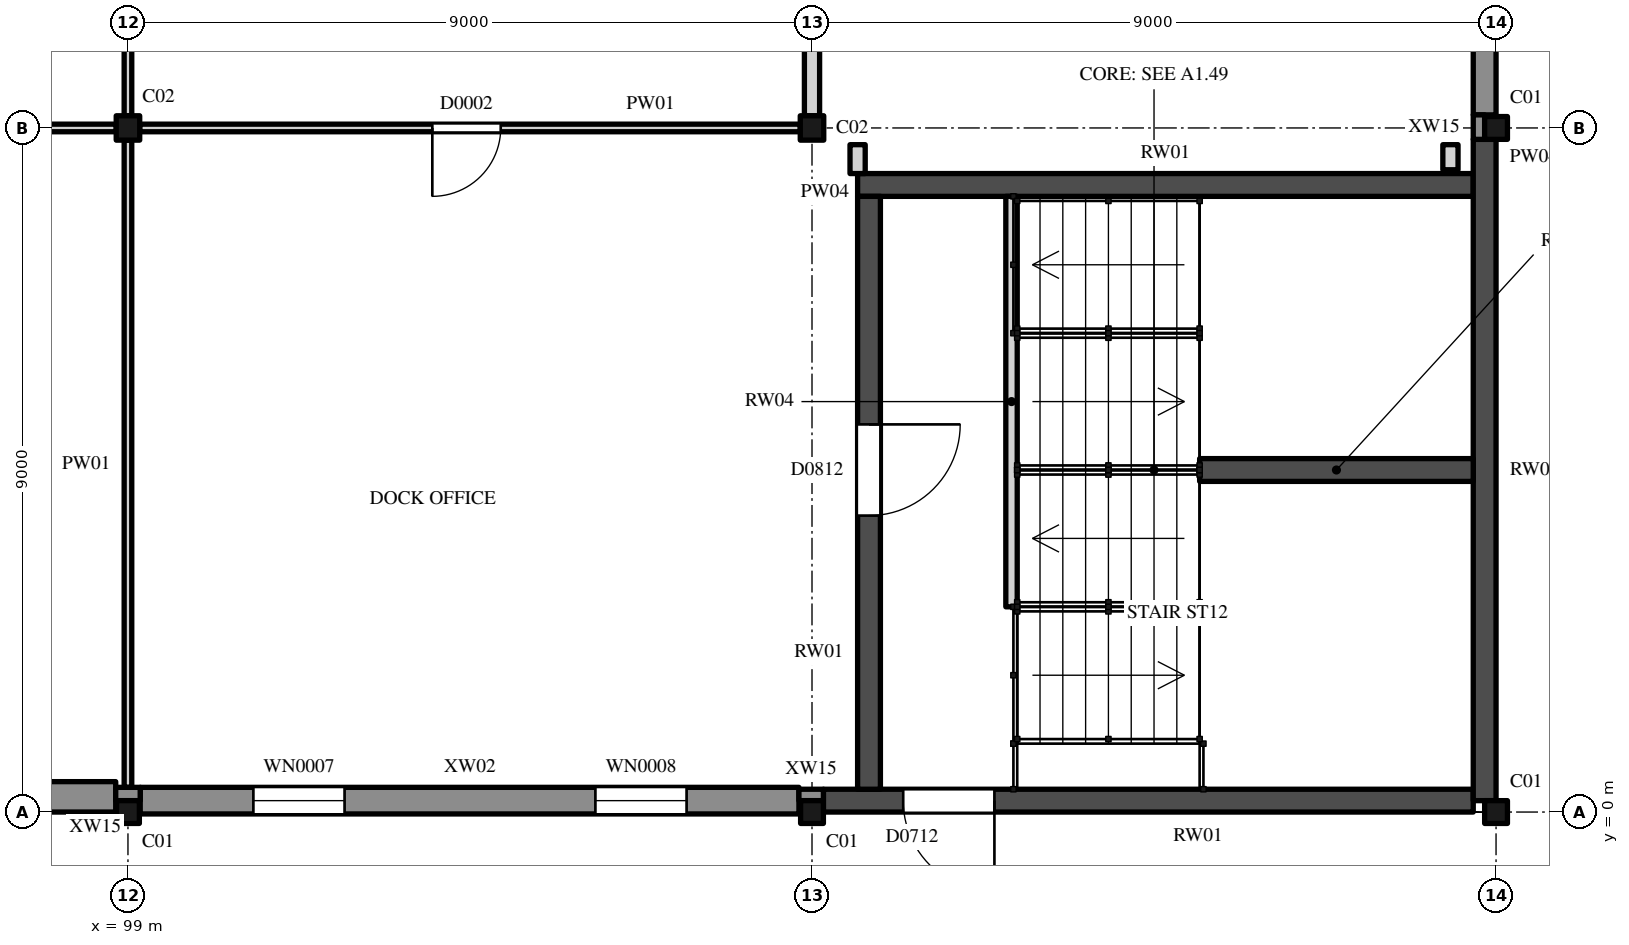
"""IFC4 building model, lengths in metres.
Left out: names, types, materials, properties, quantities, classifications, styles, units other than length and angle.
Written with IfcOpenShell. Run it as: python <this file> out.ifc"""

import sys

from ifc_helpers import new_model, si_unit, direction, frame, frame_2d, origin, origin_2d, place, context, subcontext, project, spatial, rectangle, hollow_rectangle, i_section, extrude, element, fill, save


model = new_model("IFC4")
c1 = context("Model", 3, precision=1e-05, world=origin(), true_north=direction((0.0, 1.0)))
c2 = subcontext(c1, "Body", "Model", "MODEL_VIEW")
j1 = project(units=[si_unit("LENGTHUNIT", "METRE"), si_unit("PLANEANGLEUNIT", "RADIAN")], contexts=[c1])
p1 = place(None, origin())
s1 = spatial("IfcSite", under=j1, at=p1, CompositionType="ELEMENT")
p2 = place(p1, origin())
s2 = spatial("IfcBuilding", under=s1, at=p2, CompositionType="ELEMENT")
p3 = place(p2, origin())
s3 = spatial("IfcBuildingStorey", under=s2, at=p3, CompositionType="ELEMENT", Elevation=0.0)
for number, where, z_axis, x_axis in (
    (1, (99.0, 0.0, 0.0), (0.0, 0.0, 1.0), (1.0, 0.0, 0.0)),
    (2, (108.0, 0.0, 0.0), (0.0, 0.0, 1.0), (1.0, 0.0, 0.0)),
    (3, (117.0, 0.0, 0.0), (0.0, 0.0, 1.0), (1.0, 0.0, 0.0)),
):
    element("IfcColumn", number, at=place(p3, frame(where, z_axis=z_axis, x_axis=x_axis)), inside=s3, PredefinedType="COLUMN", context=c2, shape_type="SweptSolid", body=[
        extrude(hollow_rectangle(XDim=0.3, YDim=0.3, WallThickness=0.012, InnerFilletRadius=0.019, OuterFilletRadius=0.031, at=origin_2d()), origin(), (0.0, 0.0, 1.0), 6.0),
    ])
for number, where, z_axis, x_axis in (
    (4, (99.0, 9.0, 0.0), (0.0, 0.0, 1.0), (1.0, 0.0, 0.0)),
    (5, (108.0, 9.0, 0.0), (0.0, 0.0, 1.0), (1.0, 0.0, 0.0)),
):
    element("IfcColumn", number, at=place(p3, frame(where, z_axis=z_axis, x_axis=x_axis)), inside=s3, PredefinedType="COLUMN", context=c2, shape_type="SweptSolid", body=[
        extrude(i_section(OverallWidth=0.309, OverallDepth=0.321, WebThickness=0.014, FlangeThickness=0.022, FilletRadius=0.017, at=origin_2d()), origin(), (0.0, 0.0, 1.0), 6.0),
    ])
p4 = place(p3, frame((117.0, 9.0, 0.0), z_axis=(0.0, 0.0, 1.0), x_axis=(1.0, 0.0, 0.0)))
e6 = element("IfcColumn", 6, at=p4, inside=s3, PredefinedType="COLUMN", context=c2, shape_type="SweptSolid", body=[
    extrude(hollow_rectangle(XDim=0.3, YDim=0.3, WallThickness=0.012, InnerFilletRadius=0.019, OuterFilletRadius=0.031, at=origin_2d()), origin(), (0.0, 0.0, 1.0), 6.0),
])
p5 = place(p3, frame((108.15, 0.15, 0.0), z_axis=(0.0, 0.0, 1.0), x_axis=(1.0, 0.0, 0.0)))
e7 = element("IfcWall", 7, at=p5, inside=s3, PredefinedType="SHEAR", context=c2, shape_type="SweptSolid", body=[
    extrude(rectangle(XDim=8.55, YDim=0.3, at=frame_2d((4.275, 0.0))), origin(), (0.0, 0.0, 1.0), 6.0),
])
p6 = place(p5, frame((1.05, 0.0, 0.0)))
e8 = element("IfcOpeningElement", 8, at=p6, cuts=e7, PredefinedType="OPENING", context=c2, shape_type="SweptSolid", body=[
    extrude(rectangle(XDim=1.2, YDim=2.1, at=frame_2d((0.6, 1.05))), frame((0.0, 0.16, 0.0), z_axis=(0.0, -1.0, 0.0), x_axis=(1.0, 0.0, 0.0)), (0.0, 0.0, 1.0), 0.32),
])
p7 = place(p3, frame((108.6, 8.25, 0.0), z_axis=(0.0, 0.0, 1.0), x_axis=(1.0, 0.0, 0.0)))
e9 = element("IfcWall", 9, at=p7, inside=s3, PredefinedType="SHEAR", context=c2, shape_type="SweptSolid", body=[
    extrude(rectangle(XDim=8.1, YDim=0.3, at=frame_2d((4.05, 0.0))), origin(), (0.0, 0.0, 1.0), 6.0),
])
p8 = place(p3, frame((108.75, 0.3, 0.0), z_axis=(0.0, 0.0, 1.0), x_axis=(0.0, 1.0, 0.0)))
e10 = element("IfcWall", 10, at=p8, inside=s3, PredefinedType="SHEAR", context=c2, shape_type="SweptSolid", body=[
    extrude(rectangle(XDim=7.8, YDim=0.3, at=frame_2d((3.9, 0.0))), origin(), (0.0, 0.0, 1.0), 6.0),
])
p9 = place(p8, frame((3.6, 0.0, 0.0)))
e11 = element("IfcOpeningElement", 11, at=p9, cuts=e10, PredefinedType="OPENING", context=c2, shape_type="SweptSolid", body=[
    extrude(rectangle(XDim=1.2, YDim=2.1, at=frame_2d((0.6, 1.05))), frame((0.0, 0.16, 0.0), z_axis=(0.0, -1.0, 0.0), x_axis=(1.0, 0.0, 0.0)), (0.0, 0.0, 1.0), 0.32),
])
p10 = place(p3, frame((116.85, 0.15, 0.0), z_axis=(0.0, 0.0, 1.0), x_axis=(0.0, 1.0, 0.0)))
e12 = element("IfcWall", 12, at=p10, inside=s3, PredefinedType="SHEAR", context=c2, shape_type="SweptSolid", body=[
    extrude(rectangle(XDim=8.7, YDim=0.3, at=frame_2d((4.35, 0.0))), origin(), (0.0, 0.0, 1.0), 6.0),
])
p11 = place(p3, frame((113.1, 4.5, 0.0), z_axis=(0.0, 0.0, 1.0), x_axis=(1.0, 0.0, 0.0)))
e13 = element("IfcWall", 13, at=p11, inside=s3, PredefinedType="SHEAR", context=c2, shape_type="SweptSolid", body=[
    extrude(rectangle(XDim=3.6, YDim=0.3, at=frame_2d((1.8, 0.0))), origin(), (0.0, 0.0, 1.0), 6.0),
])
p12 = place(p3, frame((110.625, 2.7, 0.0), z_axis=(0.0, 0.0, 1.0), x_axis=(0.0, 1.0, 0.0)))
e14 = element("IfcWall", 14, at=p12, inside=s3, PredefinedType="STANDARD", context=c2, shape_type="SweptSolid", body=[
    extrude(rectangle(XDim=5.4, YDim=0.15, at=frame_2d((2.7, 0.0))), origin(), (0.0, 0.0, 1.0), 2.8),
])
p13 = place(p3, frame((90.161, 0.2, 0.0), z_axis=(0.0, 0.0, 1.0), x_axis=(1.0, 0.0, 0.0)))
e15 = element("IfcWall", 15, at=p13, inside=s3, PredefinedType="SOLIDWALL", context=c2, shape_type="SweptSolid", body=[
    extrude(rectangle(XDim=8.678, YDim=0.4, at=frame_2d((4.339, 0.0))), origin(), (0.0, 0.0, 1.0), 5.419),
])
p14 = place(p13, frame((2.089, 0.0, 0.0)))
e16 = element("IfcOpeningElement", 16, at=p14, cuts=e15, PredefinedType="OPENING", context=c2, shape_type="SweptSolid", body=[
    extrude(rectangle(XDim=4.5, YDim=4.5, at=frame_2d((2.25, 2.25))), frame((0.0, 0.21, 0.0), z_axis=(0.0, -1.0, 0.0), x_axis=(1.0, 0.0, 0.0)), (0.0, 0.0, 1.0), 0.42),
])
p15 = place(p3, frame((99.161, 0.15, 0.0), z_axis=(0.0, 0.0, 1.0), x_axis=(1.0, 0.0, 0.0)))
e17 = element("IfcWall", 17, at=p15, inside=s3, PredefinedType="SOLIDWALL", context=c2, shape_type="SweptSolid", body=[
    extrude(rectangle(XDim=8.667, YDim=0.35, at=frame_2d((4.333, 0.0))), origin(), (0.0, 0.0, 1.0), 5.419),
])
p16 = place(p15, frame((1.489, 0.0, 1.2)))
e18 = element("IfcOpeningElement", 18, at=p16, cuts=e17, PredefinedType="OPENING", context=c2, shape_type="SweptSolid", body=[
    extrude(rectangle(XDim=1.2, YDim=1.5, at=frame_2d((0.6, 0.75))), frame((0.0, 0.185, 0.0), z_axis=(0.0, -1.0, 0.0), x_axis=(1.0, 0.0, 0.0)), (0.0, 0.0, 1.0), 0.37),
])
p17 = place(p15, frame((5.989, 0.0, 1.2)))
e19 = element("IfcOpeningElement", 19, at=p17, cuts=e17, PredefinedType="OPENING", context=c2, shape_type="SweptSolid", body=[
    extrude(rectangle(XDim=1.2, YDim=1.5, at=frame_2d((0.6, 0.75))), frame((0.0, 0.185, 0.0), z_axis=(0.0, -1.0, 0.0), x_axis=(1.0, 0.0, 0.0)), (0.0, 0.0, 1.0), 0.37),
])
p18 = place(p3, frame((116.85, 9.172, 0.0), z_axis=(0.0, 0.0, 1.0), x_axis=(0.0, 1.0, 0.0)))
e20 = element("IfcWall", 20, at=p18, inside=s3, PredefinedType="SOLIDWALL", context=c2, shape_type="SweptSolid", body=[
    extrude(rectangle(XDim=8.667, YDim=0.3, at=frame_2d((4.333, 0.0))), origin(), (0.0, 0.0, 1.0), 5.292),
])
p19 = place(p18, frame((3.128, 0.0, 0.9)))
e21 = element("IfcOpeningElement", 21, at=p19, cuts=e20, PredefinedType="OPENING", context=c2, shape_type="SweptSolid", body=[
    extrude(rectangle(XDim=2.4, YDim=1.8, at=frame_2d((1.2, 0.9))), frame((0.0, 0.16, 0.0), z_axis=(0.0, -1.0, 0.0), x_axis=(1.0, 0.0, 0.0)), (0.0, 0.0, 1.0), 0.32),
])
p20 = place(p3, frame((98.839, 0.238, 0.0), z_axis=(0.0, 0.0, 1.0), x_axis=(1.0, 0.0, 0.0)))
e22 = element("IfcWall", 22, at=p20, inside=s3, PredefinedType="SOLIDWALL", context=c2, shape_type="SweptSolid", body=[
    extrude(rectangle(XDim=0.322, YDim=0.175, at=frame_2d((0.161, 0.0))), origin(), (0.0, 0.0, 1.0), 5.419),
])
for number, where, z_axis, x_axis in (
    (23, (107.828, 0.225, 0.0), (0.0, 0.0, 1.0), (1.0, 0.0, 0.0)),
    (24, (116.775, 8.85, 0.0), (0.0, 0.0, 1.0), (0.0, 1.0, 0.0)),
):
    element("IfcWall", number, at=place(p3, frame(where, z_axis=z_axis, x_axis=x_axis)), inside=s3, PredefinedType="SOLIDWALL", context=c2, shape_type="SweptSolid", body=[
        extrude(rectangle(XDim=0.322, YDim=0.15, at=frame_2d((0.161, 0.0))), origin(), (0.0, 0.0, 1.0), 6.0),
    ])
p21 = place(p3, frame((90.155, 9.0, 0.0), z_axis=(0.0, 0.0, 1.0), x_axis=(1.0, 0.0, 0.0)))
e25 = element("IfcWall", 25, at=p21, inside=s3, PredefinedType="PARTITIONING", context=c2, shape_type="SweptSolid", body=[
    extrude(rectangle(XDim=8.691, YDim=0.1, at=frame_2d((4.345, 0.0))), origin(), (0.0, 0.0, 1.0), 5.419),
])
p22 = place(p3, frame((99.155, 9.0, 0.0), z_axis=(0.0, 0.0, 1.0), x_axis=(1.0, 0.0, 0.0)))
e26 = element("IfcWall", 26, at=p22, inside=s3, PredefinedType="PARTITIONING", context=c2, shape_type="SweptSolid", body=[
    extrude(rectangle(XDim=8.691, YDim=0.1, at=frame_2d((4.345, 0.0))), origin(), (0.0, 0.0, 1.0), 5.419),
])
p23 = place(p22, frame((3.85, 0.0, 0.0)))
e27 = element("IfcOpeningElement", 27, at=p23, cuts=e26, PredefinedType="OPENING", context=c2, shape_type="SweptSolid", body=[
    extrude(rectangle(XDim=0.9, YDim=2.1, at=frame_2d((0.45, 1.05))), frame((0.0, 0.06, 0.0), z_axis=(0.0, -1.0, 0.0), x_axis=(1.0, 0.0, 0.0)), (0.0, 0.0, 1.0), 0.12),
])
p24 = place(p3, frame((99.0, 0.325, 0.0), z_axis=(0.0, 0.0, 1.0), x_axis=(0.0, 1.0, 0.0)))
e28 = element("IfcWall", 28, at=p24, inside=s3, PredefinedType="PARTITIONING", context=c2, shape_type="SweptSolid", body=[
    extrude(rectangle(XDim=8.515, YDim=0.1, at=frame_2d((4.257, 0.0))), origin(), (0.0, 0.0, 1.0), 5.292),
])
p25 = place(p3, frame((99.0, 9.16, 0.0), z_axis=(0.0, 0.0, 1.0), x_axis=(0.0, 1.0, 0.0)))
e29 = element("IfcWall", 29, at=p25, inside=s3, PredefinedType="PARTITIONING", context=c2, shape_type="SweptSolid", body=[
    extrude(rectangle(XDim=8.679, YDim=0.1, at=frame_2d((4.34, 0.0))), origin(), (0.0, 0.0, 1.0), 5.292),
])
p26 = place(p25, frame((3.55, 0.0, 0.0)))
e30 = element("IfcOpeningElement", 30, at=p26, cuts=e29, PredefinedType="OPENING", context=c2, shape_type="SweptSolid", body=[
    extrude(rectangle(XDim=1.5, YDim=2.1, at=frame_2d((0.75, 1.05))), frame((0.0, 0.06, 0.0), z_axis=(0.0, -1.0, 0.0), x_axis=(1.0, 0.0, 0.0)), (0.0, 0.0, 1.0), 0.12),
])
p27 = place(p3, frame((108.0, 9.16, 0.0), z_axis=(0.0, 0.0, 1.0), x_axis=(0.0, 1.0, 0.0)))
e31 = element("IfcWall", 31, at=p27, inside=s3, PredefinedType="PARTITIONING", context=c2, shape_type="SweptSolid", body=[
    extrude(rectangle(XDim=8.679, YDim=0.2, at=frame_2d((4.34, 0.0))), origin(), (0.0, 0.0, 1.0), 5.292),
])
p28 = place(p27, frame((3.75, 0.0, 0.0)))
e32 = element("IfcOpeningElement", 32, at=p28, cuts=e31, PredefinedType="OPENING", context=c2, shape_type="SweptSolid", body=[
    extrude(rectangle(XDim=1.2, YDim=2.4, at=frame_2d((0.6, 1.2))), frame((0.0, 0.11, 0.0), z_axis=(0.0, -1.0, 0.0), x_axis=(1.0, 0.0, 0.0)), (0.0, 0.0, 1.0), 0.22),
])
p29 = place(p3, frame((108.6, 8.4, 0.0), z_axis=(0.0, 0.0, 1.0), x_axis=(0.0, 1.0, 0.0)))
e33 = element("IfcWall", 33, at=p29, inside=s3, PredefinedType="PARTITIONING", context=c2, shape_type="SweptSolid", body=[
    extrude(rectangle(XDim=0.38, YDim=0.2, at=frame_2d((0.19, 0.0))), origin(), (0.0, 0.0, 1.0), 5.825),
])
p30 = place(p3, frame((116.4, 8.45, 0.0), z_axis=(0.0, 0.0, 1.0), x_axis=(0.0, 1.0, 0.0)))
e34 = element("IfcWall", 34, at=p30, inside=s3, PredefinedType="PARTITIONING", context=c2, shape_type="SweptSolid", body=[
    extrude(rectangle(XDim=0.33, YDim=0.2, at=frame_2d((0.165, 0.0))), origin(), (0.0, 0.0, 1.0), 5.825),
])
p31 = place(p9, origin())
e35 = element("IfcDoor", 35, at=p31, inside=s3, OperationType="SINGLE_SWING_RIGHT", PredefinedType="DOOR", context=c2, shape_type="SweptSolid", body=[
    extrude(rectangle(XDim=1.2, YDim=2.1, at=frame_2d((0.6, 1.05))), frame((0.0, 0.025, 0.0), z_axis=(0.0, -1.0, 0.0), x_axis=(1.0, 0.0, 0.0)), (0.0, 0.0, 1.0), 0.05),
])
fill(e11, e35)
p32 = place(p6, frame((1.2, 0.0, 0.0), z_axis=(0.0, 0.0, 1.0), x_axis=(-1.0, 0.0, 0.0)))
e36 = element("IfcDoor", 36, at=p32, inside=s3, OperationType="SINGLE_SWING_RIGHT", PredefinedType="DOOR", context=c2, shape_type="SweptSolid", body=[
    extrude(rectangle(XDim=1.2, YDim=2.1, at=frame_2d((0.6, 1.05))), frame((0.0, 0.025, 0.0), z_axis=(0.0, -1.0, 0.0), x_axis=(1.0, 0.0, 0.0)), (0.0, 0.0, 1.0), 0.05),
])
fill(e8, e36)
p33 = place(p16, origin())
e37 = element("IfcWindow", 37, at=p33, inside=s3, PartitioningType="SINGLE_PANEL", PredefinedType="WINDOW", context=c2, shape_type="SweptSolid", body=[
    extrude(rectangle(XDim=1.2, YDim=1.5, at=frame_2d((0.6, 0.75))), frame((0.0, 0.03, 0.0), z_axis=(0.0, -1.0, 0.0), x_axis=(1.0, 0.0, 0.0)), (0.0, 0.0, 1.0), 0.06),
])
fill(e18, e37)
p34 = place(p17, origin())
e38 = element("IfcWindow", 38, at=p34, inside=s3, PartitioningType="SINGLE_PANEL", PredefinedType="WINDOW", context=c2, shape_type="SweptSolid", body=[
    extrude(rectangle(XDim=1.2, YDim=1.5, at=frame_2d((0.6, 0.75))), frame((0.0, 0.03, 0.0), z_axis=(0.0, -1.0, 0.0), x_axis=(1.0, 0.0, 0.0)), (0.0, 0.0, 1.0), 0.06),
])
fill(e19, e38)
p35 = place(p23, origin())
e39 = element("IfcDoor", 39, at=p35, inside=s3, OperationType="SINGLE_SWING_LEFT", PredefinedType="DOOR", context=c2, shape_type="SweptSolid", body=[
    extrude(rectangle(XDim=0.9, YDim=2.1, at=frame_2d((0.45, 1.05))), frame((0.0, 0.025, 0.0), z_axis=(0.0, -1.0, 0.0), x_axis=(1.0, 0.0, 0.0)), (0.0, 0.0, 1.0), 0.05),
])
fill(e27, e39)
save(model, sys.argv[1])
